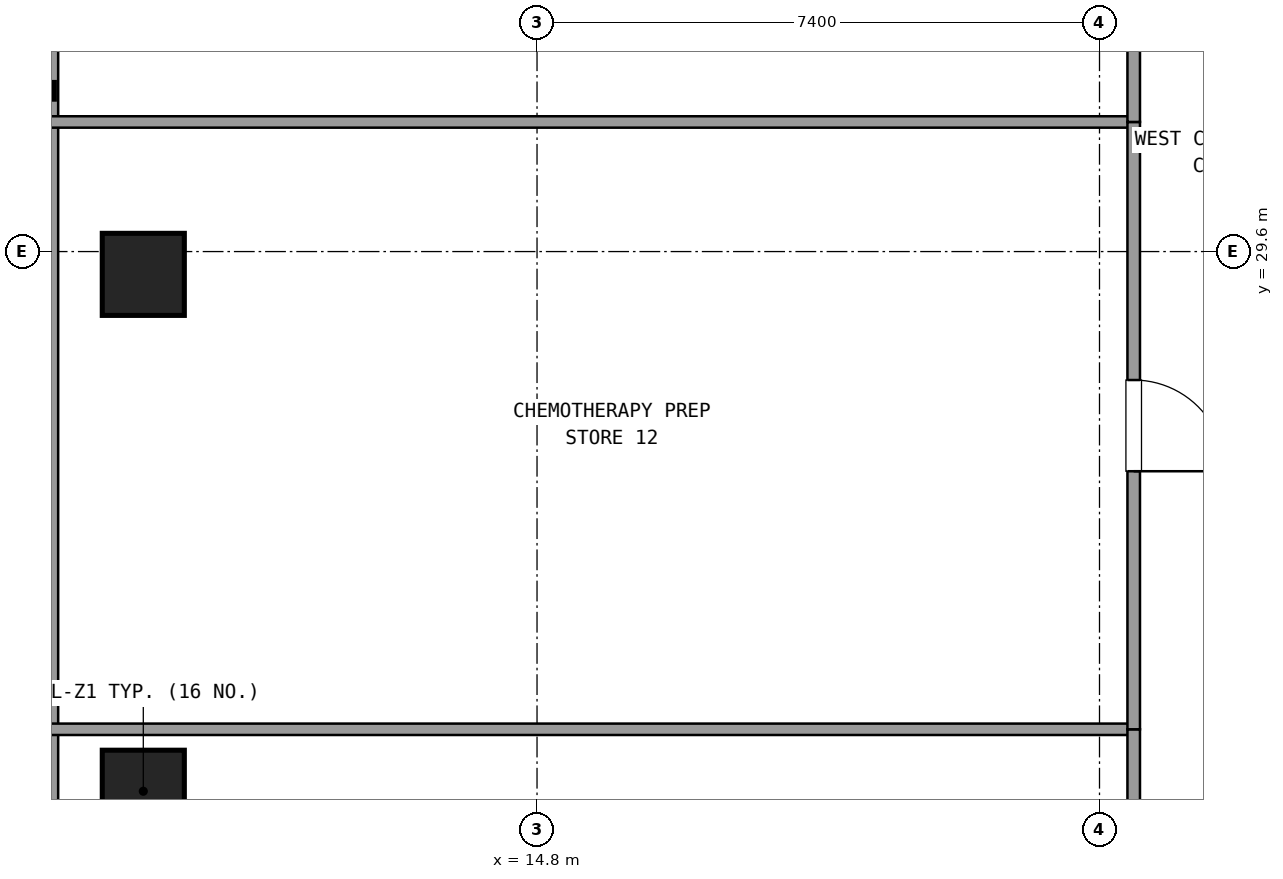
"""IFC4 building model, lengths in metres.
Left out: names, types, materials, properties, quantities, classifications, styles, units other than length and angle.
Written with IfcOpenShell. Run it as: python <this file> out.ifc"""

import sys

from ifc_helpers import new_model, si_unit, direction, frame, frame_2d, origin, origin_2d, place, context, subcontext, project, spatial, rectangle, extrude, element, fill, save


model = new_model("IFC4")
c1 = context("Model", 3, precision=1e-05, world=origin(), true_north=direction((0.0, 1.0)))
c2 = subcontext(c1, "Body", "Model", "MODEL_VIEW")
j1 = project(units=[si_unit("LENGTHUNIT", "METRE"), si_unit("PLANEANGLEUNIT", "RADIAN")], contexts=[c1])
p1 = place(None, origin())
s1 = spatial("IfcSite", under=j1, at=p1, CompositionType="ELEMENT")
p2 = place(p1, origin())
s2 = spatial("IfcBuilding", under=s1, at=p2, CompositionType="ELEMENT")
p3 = place(p2, frame((0.0, 0.0, 59.94)))
s3 = spatial("IfcBuildingStorey", under=s2, at=p3, CompositionType="ELEMENT", Elevation=59.94)
for number, where, z_axis, x_axis in (
    (1, (9.62, 22.5, 0.0), (0.0, 0.0, 1.0), (1.0, 0.0, 0.0)),
    (2, (9.62, 29.3, 0.0), (0.0, 0.0, 1.0), (1.0, 0.0, 0.0)),
):
    element("IfcColumn", number, at=place(p3, frame(where, z_axis=z_axis, x_axis=x_axis)), inside=s3, PredefinedType="COLUMN", context=c2, shape_type="SweptSolid", body=[
        extrude(rectangle(XDim=1.08, YDim=1.08, at=origin_2d()), origin(), (0.0, 0.0, 1.0), 3.6),
    ])
p4 = place(p3, frame((8.38, 43.345, 0.0), z_axis=(0.0, 0.0, 1.0), x_axis=(0.0, -1.0, 0.0)))
e3 = element("IfcWall", 3, at=p4, inside=s3, PredefinedType="SOLIDWALL", context=c2, shape_type="SweptSolid", body=[
    extrude(rectangle(XDim=34.89, YDim=0.24, at=frame_2d((17.445, 0.0))), origin(), (0.0, 0.0, 1.0), 0.85),
])
p5 = place(p3, frame((22.65, 23.315, 0.0), z_axis=(0.0, 0.0, 1.0), x_axis=(-1.0, 0.0, 0.0)))
e4 = element("IfcWall", 4, at=p5, inside=s3, PredefinedType="PARTITIONING", context=c2, shape_type="SweptSolid", body=[
    extrude(rectangle(XDim=14.25, YDim=0.15, at=frame_2d((7.125, 0.0))), origin(), (0.0, 0.0, 1.0), 2.61),
])
p6 = place(p3, frame((22.65, 18.183, 0.0), z_axis=(0.0, 0.0, 1.0), x_axis=(0.0, 1.0, 0.0)))
e5 = element("IfcWall", 5, at=p6, inside=s3, PredefinedType="PARTITIONING", context=c2, shape_type="SweptSolid", body=[
    extrude(rectangle(XDim=5.132, YDim=0.165, at=frame_2d((2.566, 0.0))), origin(), (0.0, 0.0, 1.0), 2.61),
])
p7 = place(p6, frame((1.966, 0.0, 0.0)))
e6 = element("IfcOpeningElement", 6, at=p7, cuts=e5, PredefinedType="OPENING", context=c2, shape_type="SweptSolid", body=[
    extrude(rectangle(XDim=1.2, YDim=2.15, at=frame_2d((0.6, 1.075))), frame((0.0, 0.093, 0.0), z_axis=(0.0, -1.0, 0.0), x_axis=(1.0, 0.0, 0.0)), (0.0, 0.0, 1.0), 0.185),
])
p8 = place(p3, frame((22.65, 31.305, 0.0), z_axis=(0.0, 0.0, 1.0), x_axis=(-1.0, 0.0, 0.0)))
e7 = element("IfcWall", 7, at=p8, inside=s3, PredefinedType="PARTITIONING", context=c2, shape_type="SweptSolid", body=[
    extrude(rectangle(XDim=14.25, YDim=0.15, at=frame_2d((7.125, 0.0))), origin(), (0.0, 0.0, 1.0), 2.61),
])
p9 = place(p3, frame((22.65, 23.315, 0.0), z_axis=(0.0, 0.0, 1.0), x_axis=(0.0, 1.0, 0.0)))
e8 = element("IfcWall", 8, at=p9, inside=s3, PredefinedType="PARTITIONING", context=c2, shape_type="SweptSolid", body=[
    extrude(rectangle(XDim=7.99, YDim=0.165, at=frame_2d((3.995, 0.0))), origin(), (0.0, 0.0, 1.0), 2.61),
])
p10 = place(p9, frame((3.395, 0.0, 0.0)))
e9 = element("IfcOpeningElement", 9, at=p10, cuts=e8, PredefinedType="OPENING", context=c2, shape_type="SweptSolid", body=[
    extrude(rectangle(XDim=1.2, YDim=2.15, at=frame_2d((0.6, 1.075))), frame((0.0, 0.093, 0.0), z_axis=(0.0, -1.0, 0.0), x_axis=(1.0, 0.0, 0.0)), (0.0, 0.0, 1.0), 0.185),
])
p11 = place(p3, frame((22.65, 31.305, 0.0), z_axis=(0.0, 0.0, 1.0), x_axis=(0.0, 1.0, 0.0)))
e10 = element("IfcWall", 10, at=p11, inside=s3, PredefinedType="PARTITIONING", context=c2, shape_type="SweptSolid", body=[
    extrude(rectangle(XDim=6.345, YDim=0.165, at=frame_2d((3.172, 0.0))), origin(), (0.0, 0.0, 1.0), 2.61),
])
p12 = place(p11, frame((2.572, 0.0, 0.0)))
e11 = element("IfcOpeningElement", 11, at=p12, cuts=e10, PredefinedType="OPENING", context=c2, shape_type="SweptSolid", body=[
    extrude(rectangle(XDim=1.2, YDim=2.15, at=frame_2d((0.6, 1.075))), frame((0.0, 0.093, 0.0), z_axis=(0.0, -1.0, 0.0), x_axis=(1.0, 0.0, 0.0)), (0.0, 0.0, 1.0), 0.185),
])
p13 = place(p10, frame((1.2, 0.0, 0.0), z_axis=(0.0, 0.0, 1.0), x_axis=(-1.0, 0.0, 0.0)))
e12 = element("IfcDoor", 12, at=p13, inside=s3, OperationType="SINGLE_SWING_LEFT", PredefinedType="DOOR", context=c2, shape_type="SweptSolid", body=[
    extrude(rectangle(XDim=1.2, YDim=2.15, at=frame_2d((0.6, 1.075))), frame((0.0, 0.025, 0.0), z_axis=(0.0, -1.0, 0.0), x_axis=(1.0, 0.0, 0.0)), (0.0, 0.0, 1.0), 0.05),
])
fill(e9, e12)
save(model, sys.argv[1])
